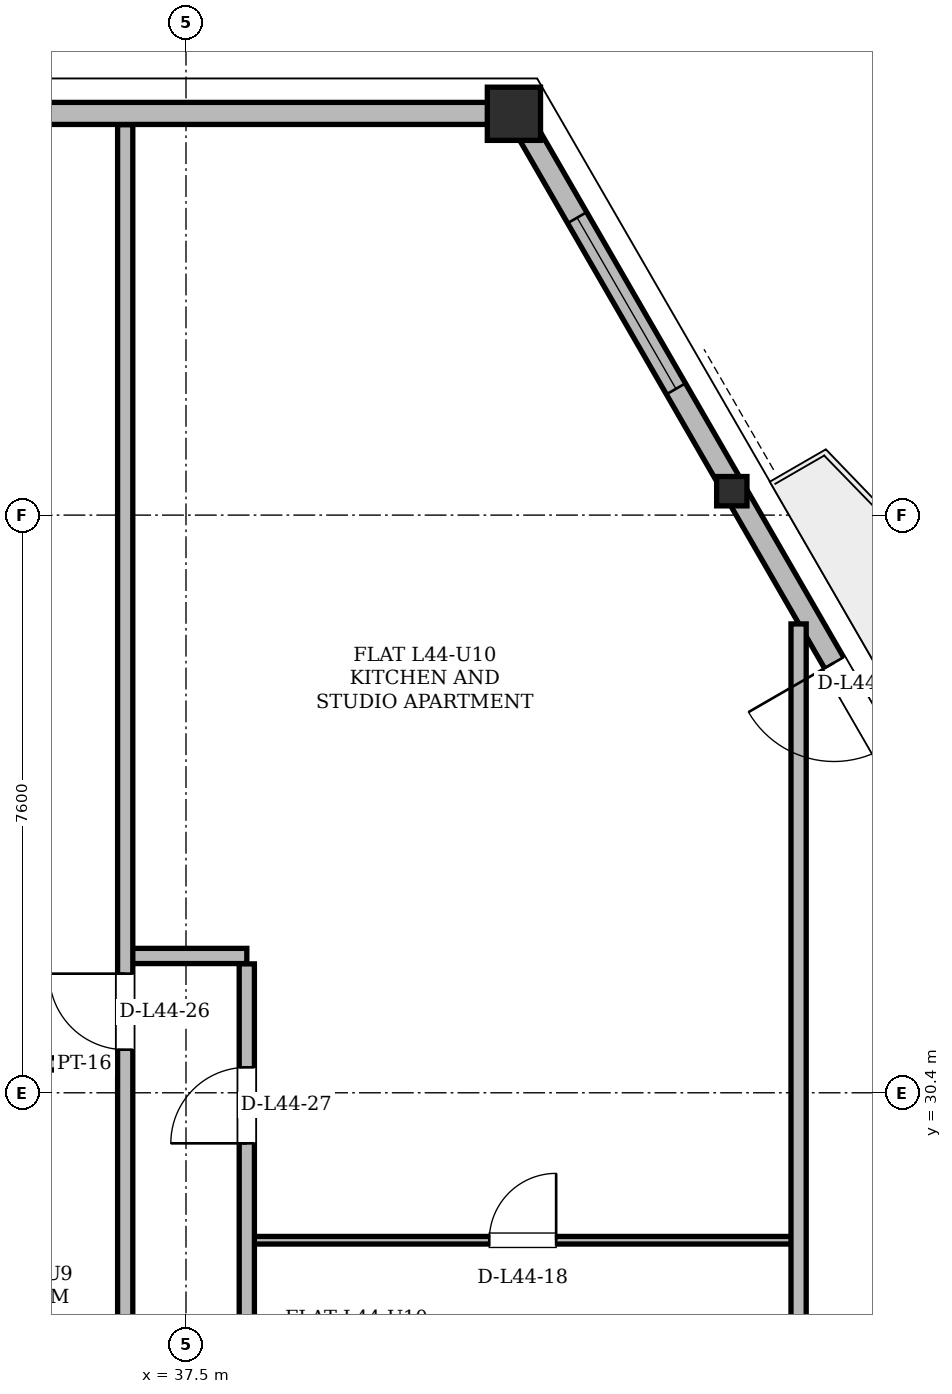
"""IFC4 building model, lengths in metres.
Left out: names, types, materials, properties, quantities, classifications, styles, units other than length and angle.
Written with IfcOpenShell. Run it as: python <this file> out.ifc"""

import sys

from ifc_helpers import new_model, si_unit, direction, frame, frame_2d, origin, origin_2d, place, context, subcontext, project, spatial, rectangle, hollow_rectangle, i_section, extrude, element, fill, save


model = new_model("IFC4")
c1 = context("Model", 3, precision=1e-05, world=origin(), true_north=direction((0.0, 1.0)))
c2 = subcontext(c1, "Body", "Model", "MODEL_VIEW")
j1 = project(units=[si_unit("LENGTHUNIT", "METRE"), si_unit("PLANEANGLEUNIT", "RADIAN")], contexts=[c1])
p1 = place(None, origin())
s1 = spatial("IfcSite", under=j1, at=p1, CompositionType="ELEMENT")
p2 = place(p1, origin())
s2 = spatial("IfcBuilding", under=s1, at=p2, CompositionType="ELEMENT")
p3 = place(p2, frame((0.0, 0.0, 167.4)))
s3 = spatial("IfcBuildingStorey", under=s2, at=p3, CompositionType="ELEMENT", Elevation=167.4)
p4 = place(p3, frame((41.854, 43.285, 0.005), z_axis=(-0.022293656021, -0.002582801612, 0.999748129299), x_axis=(0.115083900766, -0.99335577503, 0.0)))
e1 = element("IfcColumn", 1, at=p4, inside=s3, PredefinedType="COLUMN", context=c2, shape_type="SweptSolid", body=[
    extrude(hollow_rectangle(XDim=0.7, YDim=0.7, WallThickness=0.055, at=origin_2d()), origin(), (0.0, 0.0, 1.0), 3.592),
])
p5 = place(p3, frame((44.719, 38.324, 0.005), z_axis=(-0.020798819059, -0.005097749769, 0.999770684744), x_axis=(0.238052057965, -0.971252396496, 0.0)))
e2 = element("IfcColumn", 2, at=p5, inside=s3, PredefinedType="COLUMN", context=c2, shape_type="SweptSolid", body=[
    extrude(i_section(OverallWidth=0.399, OverallDepth=0.386, WebThickness=0.021, FlangeThickness=0.033, at=origin_2d()), origin(), (0.0, 0.0, 1.0), 3.592),
])
p6 = place(p3, frame((59.756, 12.279, 0.0), z_axis=(0.0, 0.0, 1.0), x_axis=(-0.499997523705, 0.86602683347, 0.0)))
e3 = element("IfcWall", 3, at=p6, inside=s3, PredefinedType="SOLIDWALL", context=c2, shape_type="SweptSolid", body=[
    extrude(rectangle(XDim=35.802, YDim=0.29, at=frame_2d((17.901, 0.0))), origin(), (0.0, 0.0, 1.0), 2.6),
])
p7 = place(p6, frame((6.579, 0.0, 0.0)))
e4 = element("IfcOpeningElement", 4, at=p7, cuts=e3, PredefinedType="OPENING", context=c2, shape_type="SweptSolid", body=[
    extrude(rectangle(XDim=1.5, YDim=2.2, at=frame_2d((0.75, 1.1))), frame((0.0, 0.145, 0.0), z_axis=(0.0, -1.0, 0.0), x_axis=(1.0, 0.0, 0.0)), (0.0, 0.0, 1.0), 0.29),
])
p8 = place(p6, frame((26.158, 0.0, 0.0)))
e5 = element("IfcOpeningElement", 5, at=p8, cuts=e3, PredefinedType="OPENING", context=c2, shape_type="SweptSolid", body=[
    extrude(rectangle(XDim=1.3, YDim=2.2, at=frame_2d((0.65, 1.1))), frame((0.0, 0.145, 0.0), z_axis=(0.0, -1.0, 0.0), x_axis=(1.0, 0.0, 0.0)), (0.0, 0.0, 1.0), 0.29),
])
p9 = place(p6, frame((1.25, 0.0, 0.85)))
e6 = element("IfcOpeningElement", 6, at=p9, cuts=e3, PredefinedType="OPENING", context=c2, shape_type="SweptSolid", body=[
    extrude(rectangle(XDim=1.2, YDim=1.48, at=frame_2d((0.6, 0.74))), frame((0.0, 0.145, 0.0), z_axis=(0.0, -1.0, 0.0), x_axis=(1.0, 0.0, 0.0)), (0.0, 0.0, 1.0), 0.29),
])
p10 = place(p6, frame((17.033, 0.0, 0.85)))
e7 = element("IfcOpeningElement", 7, at=p10, cuts=e3, PredefinedType="OPENING", context=c2, shape_type="SweptSolid", body=[
    extrude(rectangle(XDim=2.6, YDim=1.64, at=frame_2d((1.3, 0.82))), frame((0.0, 0.145, 0.0), z_axis=(0.0, -1.0, 0.0), x_axis=(1.0, 0.0, 0.0)), (0.0, 0.0, 1.0), 0.29),
])
p11 = place(p6, frame((21.982, 0.0, 0.85)))
e8 = element("IfcOpeningElement", 8, at=p11, cuts=e3, PredefinedType="OPENING", context=c2, shape_type="SweptSolid", body=[
    extrude(rectangle(XDim=2.0, YDim=1.64, at=frame_2d((1.0, 0.82))), frame((0.0, 0.145, 0.0), z_axis=(0.0, -1.0, 0.0), x_axis=(1.0, 0.0, 0.0)), (0.0, 0.0, 1.0), 0.29),
])
p12 = place(p6, frame((13.347, 0.0, 0.85)))
e9 = element("IfcOpeningElement", 9, at=p12, cuts=e3, PredefinedType="OPENING", context=c2, shape_type="SweptSolid", body=[
    extrude(rectangle(XDim=1.6, YDim=1.64, at=frame_2d((0.8, 0.82))), frame((0.0, 0.145, 0.0), z_axis=(0.0, -1.0, 0.0), x_axis=(1.0, 0.0, 0.0)), (0.0, 0.0, 1.0), 0.29),
])
p13 = place(p6, frame((31.619, 0.0, 0.85)))
e10 = element("IfcOpeningElement", 10, at=p13, cuts=e3, PredefinedType="OPENING", context=c2, shape_type="SweptSolid", body=[
    extrude(rectangle(XDim=2.6, YDim=1.64, at=frame_2d((1.3, 0.82))), frame((0.0, 0.145, 0.0), z_axis=(0.0, -1.0, 0.0), x_axis=(1.0, 0.0, 0.0)), (0.0, 0.0, 1.0), 0.29),
])
p14 = place(p3, frame((41.854, 43.285, 0.0), z_axis=(0.0, 0.0, 1.0), x_axis=(-1.0, 0.0, 0.0)))
e11 = element("IfcWall", 11, at=p14, inside=s3, PredefinedType="SOLIDWALL", context=c2, shape_type="SweptSolid", body=[
    extrude(rectangle(XDim=8.709, YDim=0.29, at=frame_2d((4.354, 0.0))), origin(), (0.0, 0.0, 1.0), 2.6),
])
p15 = place(p3, frame((38.218, 28.46, 0.0), z_axis=(0.0, 0.0, 1.0), x_axis=(1.0, 0.0, 0.0)))
e12 = element("IfcWall", 12, at=p15, inside=s3, PredefinedType="PARTITIONING", context=c2, shape_type="SweptSolid", body=[
    extrude(rectangle(XDim=7.424, YDim=0.1, at=frame_2d((3.712, 0.0))), origin(), (0.0, 0.0, 1.0), 3.38),
])
p16 = place(p15, frame((3.272, 0.0, 0.0)))
e13 = element("IfcOpeningElement", 13, at=p16, cuts=e12, PredefinedType="OPENING", context=c2, shape_type="SweptSolid", body=[
    extrude(rectangle(XDim=0.88, YDim=2.08, at=frame_2d((0.44, 1.04))), frame((0.0, 0.05, 0.0), z_axis=(0.0, -1.0, 0.0), x_axis=(1.0, 0.0, 0.0)), (0.0, 0.0, 1.0), 0.1),
])
p17 = place(p3, frame((33.518, 30.78, 0.0), z_axis=(0.0, 0.0, 1.0), x_axis=(1.0, 0.0, 0.0)))
e14 = element("IfcWall", 14, at=p17, inside=s3, PredefinedType="PARTITIONING", context=c2, shape_type="SweptSolid", body=[
    extrude(rectangle(XDim=3.264, YDim=0.16, at=frame_2d((1.632, 0.0))), origin(), (0.0, 0.0, 1.0), 3.38),
])
p18 = place(p17, frame((1.192, 0.0, 0.0)))
e15 = element("IfcOpeningElement", 15, at=p18, cuts=e14, PredefinedType="OPENING", context=c2, shape_type="SweptSolid", body=[
    extrude(rectangle(XDim=0.88, YDim=2.08, at=frame_2d((0.44, 1.04))), frame((0.0, 0.08, 0.0), z_axis=(0.0, -1.0, 0.0), x_axis=(1.0, 0.0, 0.0)), (0.0, 0.0, 1.0), 0.16),
])
p19 = place(p3, frame((36.7, 32.2, 0.0), z_axis=(0.0, 0.0, 1.0), x_axis=(1.0, 0.0, 0.0)))
e16 = element("IfcWall", 16, at=p19, inside=s3, PredefinedType="PARTITIONING", context=c2, shape_type="SweptSolid", body=[
    extrude(rectangle(XDim=1.6, YDim=0.2, at=frame_2d((0.8, 0.0))), origin(), (0.0, 0.0, 1.0), 3.38),
])
p20 = place(p3, frame((36.7, 26.074, 0.0), z_axis=(0.0, 0.0, 1.0), x_axis=(0.0, 1.0, 0.0)))
e17 = element("IfcWall", 17, at=p20, inside=s3, PredefinedType="PARTITIONING", context=c2, shape_type="SweptSolid", body=[
    extrude(rectangle(XDim=17.062, YDim=0.2, at=frame_2d((8.531, 0.0))), origin(), (0.0, 0.0, 1.0), 3.38),
])
p21 = place(p20, frame((4.893, 0.0, 0.0)))
e18 = element("IfcOpeningElement", 18, at=p21, cuts=e17, PredefinedType="OPENING", context=c2, shape_type="SweptSolid", body=[
    extrude(rectangle(XDim=1.0, YDim=2.18, at=frame_2d((0.5, 1.09))), frame((0.0, 0.1, 0.0), z_axis=(0.0, -1.0, 0.0), x_axis=(1.0, 0.0, 0.0)), (0.0, 0.0, 1.0), 0.2),
])
p22 = place(p3, frame((38.3, 26.074, 0.0), z_axis=(0.0, 0.0, 1.0), x_axis=(0.0, 1.0, 0.0)))
e19 = element("IfcWall", 19, at=p22, inside=s3, PredefinedType="PARTITIONING", context=c2, shape_type="SweptSolid", body=[
    extrude(rectangle(XDim=6.022, YDim=0.2, at=frame_2d((3.011, 0.0))), origin(), (0.0, 0.0, 1.0), 3.38),
])
p23 = place(p22, frame((3.661, 0.0, 0.0)))
e20 = element("IfcOpeningElement", 20, at=p23, cuts=e19, PredefinedType="OPENING", context=c2, shape_type="SweptSolid", body=[
    extrude(rectangle(XDim=1.0, YDim=2.18, at=frame_2d((0.5, 1.09))), frame((0.0, 0.1, 0.0), z_axis=(0.0, -1.0, 0.0), x_axis=(1.0, 0.0, 0.0)), (0.0, 0.0, 1.0), 0.2),
])
p24 = place(p3, frame((45.56, 26.074, 0.0), z_axis=(0.0, 0.0, 1.0), x_axis=(0.0, 1.0, 0.0)))
e21 = element("IfcWall", 21, at=p24, inside=s3, PredefinedType="PARTITIONING", context=c2, shape_type="SweptSolid", body=[
    extrude(rectangle(XDim=10.494, YDim=0.2, at=frame_2d((5.247, 0.0))), origin(), (0.0, 0.0, 1.0), 2.6),
])
p25 = place(p8, origin())
e22 = element("IfcDoor", 22, at=p25, inside=s3, OperationType="SINGLE_SWING_RIGHT", PredefinedType="DOOR", context=c2, shape_type="SweptSolid", body=[
    extrude(rectangle(XDim=1.3, YDim=2.2, at=frame_2d((0.65, 1.1))), frame((0.0, 0.025, 0.0), z_axis=(0.0, -1.0, 0.0), x_axis=(1.0, 0.0, 0.0)), (0.0, 0.0, 1.0), 0.05),
])
fill(e5, e22)
p26 = place(p13, origin())
e23 = element("IfcWindow", 23, at=p26, inside=s3, PartitioningType="SINGLE_PANEL", PredefinedType="WINDOW", context=c2, shape_type="SweptSolid", body=[
    extrude(rectangle(XDim=2.6, YDim=1.64, at=frame_2d((1.3, 0.82))), frame((0.0, 0.03, 0.0), z_axis=(0.0, -1.0, 0.0), x_axis=(1.0, 0.0, 0.0)), (0.0, 0.0, 1.0), 0.06),
])
fill(e10, e23)
p27 = place(p16, origin())
e24 = element("IfcDoor", 24, at=p27, inside=s3, OperationType="SINGLE_SWING_RIGHT", PredefinedType="DOOR", context=c2, shape_type="SweptSolid", body=[
    extrude(rectangle(XDim=0.88, YDim=2.08, at=frame_2d((0.44, 1.04))), frame((0.0, 0.025, 0.0), z_axis=(0.0, -1.0, 0.0), x_axis=(1.0, 0.0, 0.0)), (0.0, 0.0, 1.0), 0.05),
])
fill(e13, e24)
p28 = place(p21, origin())
e25 = element("IfcDoor", 25, at=p28, inside=s3, OperationType="SINGLE_SWING_RIGHT", PredefinedType="DOOR", context=c2, shape_type="SweptSolid", body=[
    extrude(rectangle(XDim=1.0, YDim=2.18, at=frame_2d((0.5, 1.09))), frame((0.0, 0.025, 0.0), z_axis=(0.0, -1.0, 0.0), x_axis=(1.0, 0.0, 0.0)), (0.0, 0.0, 1.0), 0.05),
])
fill(e18, e25)
p29 = place(p23, origin())
e26 = element("IfcDoor", 26, at=p29, inside=s3, OperationType="SINGLE_SWING_LEFT", PredefinedType="DOOR", context=c2, shape_type="SweptSolid", body=[
    extrude(rectangle(XDim=1.0, YDim=2.18, at=frame_2d((0.5, 1.09))), frame((0.0, 0.025, 0.0), z_axis=(0.0, -1.0, 0.0), x_axis=(1.0, 0.0, 0.0)), (0.0, 0.0, 1.0), 0.05),
])
fill(e20, e26)
save(model, sys.argv[1])
